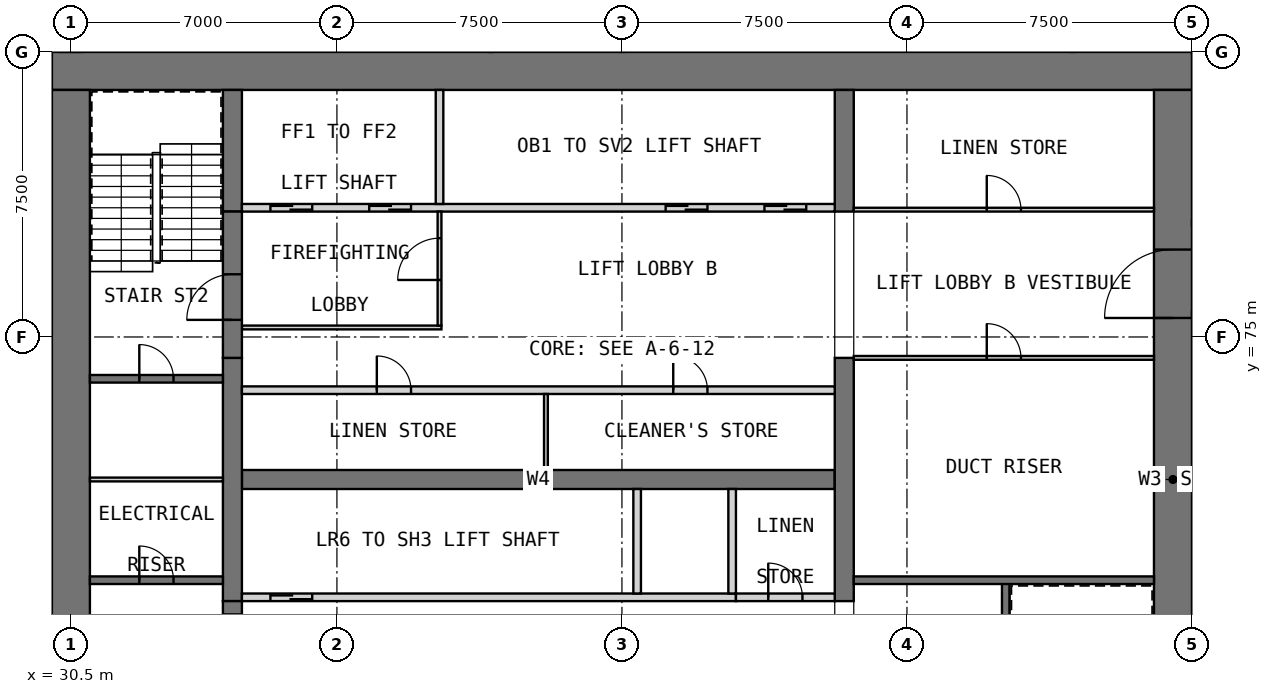
"""IFC4 building model, lengths in metres.
Left out: names, types, materials, properties, quantities, classifications, styles, units other than length and angle.
Written with IfcOpenShell. Run it as: python <this file> out.ifc"""

import sys

from ifc_helpers import new_model, si_unit, direction, frame, frame_2d, origin, place, context, subcontext, project, spatial, rectangle, extrude, element, fill, save


model = new_model("IFC4")
c1 = context("Model", 3, precision=1e-05, world=origin(), true_north=direction((0.0, 1.0)))
c2 = subcontext(c1, "Body", "Model", "MODEL_VIEW")
j1 = project(units=[si_unit("LENGTHUNIT", "METRE"), si_unit("PLANEANGLEUNIT", "RADIAN")], contexts=[c1])
p1 = place(None, origin())
s1 = spatial("IfcSite", under=j1, at=p1, CompositionType="ELEMENT")
p2 = place(p1, origin())
s2 = spatial("IfcBuilding", under=s1, at=p2, CompositionType="ELEMENT")
p3 = place(p2, frame((0.0, 0.0, 44.8)))
s3 = spatial("IfcBuildingStorey", under=s2, at=p3, CompositionType="ELEMENT", Elevation=44.8)
p4 = place(p3, frame((30.0, 82.0, 0.0), z_axis=(0.0, 0.0, 1.0), x_axis=(1.0, 0.0, 0.0)))
e1 = element("IfcWall", 1, at=p4, inside=s3, PredefinedType="SHEAR", context=c2, shape_type="SweptSolid", body=[
    extrude(rectangle(XDim=30.0, YDim=1.0, at=frame_2d((15.0, 0.0))), origin(), (0.0, 0.0, 1.0), 3.6),
])
p5 = place(p3, frame((30.5, 61.0, 0.0), z_axis=(0.0, 0.0, 1.0), x_axis=(0.0, 1.0, 0.0)))
e2 = element("IfcWall", 2, at=p5, inside=s3, PredefinedType="SHEAR", context=c2, shape_type="SweptSolid", body=[
    extrude(rectangle(XDim=20.5, YDim=1.0, at=frame_2d((10.25, 0.0))), origin(), (0.0, 0.0, 1.0), 3.6),
])
p6 = place(p3, frame((59.5, 61.0, 0.0), z_axis=(0.0, 0.0, 1.0), x_axis=(0.0, 1.0, 0.0)))
e3 = element("IfcWall", 3, at=p6, inside=s3, PredefinedType="SHEAR", context=c2, shape_type="SweptSolid", body=[
    extrude(rectangle(XDim=20.5, YDim=1.0, at=frame_2d((10.25, 0.0))), origin(), (0.0, 0.0, 1.0), 3.6),
])
p7 = place(p6, frame((14.5, 0.0, 0.0)))
e4 = element("IfcOpeningElement", 4, at=p7, cuts=e3, PredefinedType="OPENING", context=c2, shape_type="SweptSolid", body=[
    extrude(rectangle(XDim=1.8, YDim=2.1, at=frame_2d((0.9, 1.05))), frame((0.0, 0.51, 0.0), z_axis=(0.0, -1.0, 0.0), x_axis=(1.0, 0.0, 0.0)), (0.0, 0.0, 1.0), 1.02),
])
p8 = place(p3, frame((35.0, 71.25, 0.0), z_axis=(0.0, 0.0, 1.0), x_axis=(1.0, 0.0, 0.0)))
e5 = element("IfcWall", 5, at=p8, inside=s3, PredefinedType="SHEAR", context=c2, shape_type="SweptSolid", body=[
    extrude(rectangle(XDim=15.6, YDim=0.5, at=frame_2d((7.8, 0.0))), origin(), (0.0, 0.0, 1.0), 3.6),
])
p9 = place(p3, frame((34.75, 68.05, 0.0), z_axis=(0.0, 0.0, 1.0), x_axis=(0.0, 1.0, 0.0)))
e6 = element("IfcWall", 6, at=p9, inside=s3, PredefinedType="SHEAR", context=c2, shape_type="SweptSolid", body=[
    extrude(rectangle(XDim=6.4, YDim=0.5, at=frame_2d((3.2, 0.0))), origin(), (0.0, 0.0, 1.0), 3.6),
])
p10 = place(p3, frame((34.75, 78.3, 0.0), z_axis=(0.0, 0.0, 1.0), x_axis=(0.0, 1.0, 0.0)))
e7 = element("IfcWall", 7, at=p10, inside=s3, PredefinedType="SHEAR", context=c2, shape_type="SweptSolid", body=[
    extrude(rectangle(XDim=3.2, YDim=0.5, at=frame_2d((1.6, 0.0))), origin(), (0.0, 0.0, 1.0), 3.6),
])
p11 = place(p3, frame((50.85, 68.05, 0.0), z_axis=(0.0, 0.0, 1.0), x_axis=(0.0, 1.0, 0.0)))
e8 = element("IfcWall", 8, at=p11, inside=s3, PredefinedType="SHEAR", context=c2, shape_type="SweptSolid", body=[
    extrude(rectangle(XDim=6.4, YDim=0.5, at=frame_2d((3.2, 0.0))), origin(), (0.0, 0.0, 1.0), 3.6),
])
p12 = place(p3, frame((50.85, 78.3, 0.0), z_axis=(0.0, 0.0, 1.0), x_axis=(0.0, 1.0, 0.0)))
e9 = element("IfcWall", 9, at=p12, inside=s3, PredefinedType="SHEAR", context=c2, shape_type="SweptSolid", body=[
    extrude(rectangle(XDim=3.2, YDim=0.5, at=frame_2d((1.6, 0.0))), origin(), (0.0, 0.0, 1.0), 3.6),
])
p13 = place(p3, frame((35.0, 68.15, 0.0), z_axis=(0.0, 0.0, 1.0), x_axis=(1.0, 0.0, 0.0)))
e10 = element("IfcWall", 10, at=p13, inside=s3, PredefinedType="SOLIDWALL", context=c2, shape_type="SweptSolid", body=[
    extrude(rectangle(XDim=13.0, YDim=0.2, at=frame_2d((6.5, 0.0))), origin(), (0.0, 0.0, 1.0), 3.6),
])
p14 = place(p13, frame((0.75, 0.0, 0.0)))
e11 = element("IfcOpeningElement", 11, at=p14, cuts=e10, PredefinedType="OPENING", context=c2, shape_type="SweptSolid", body=[
    extrude(rectangle(XDim=1.1, YDim=2.1, at=frame_2d((0.55, 1.05))), frame((0.0, 0.11, 0.0), z_axis=(0.0, -1.0, 0.0), x_axis=(1.0, 0.0, 0.0)), (0.0, 0.0, 1.0), 0.22),
])
for number, where, z_axis, x_axis in (
    (12, (45.4, 68.25, 0.0), (0.0, 0.0, 1.0), (0.0, 1.0, 0.0)),
    (13, (47.9, 68.25, 0.0), (0.0, 0.0, 1.0), (0.0, 1.0, 0.0)),
):
    element("IfcWall", number, at=place(p3, frame(where, z_axis=z_axis, x_axis=x_axis)), inside=s3, PredefinedType="SOLIDWALL", context=c2, shape_type="SweptSolid", body=[
        extrude(rectangle(XDim=2.75, YDim=0.2, at=frame_2d((1.375, 0.0))), origin(), (0.0, 0.0, 1.0), 3.6),
    ])
p15 = place(p3, frame((48.0, 68.15, 0.0), z_axis=(0.0, 0.0, 1.0), x_axis=(1.0, 0.0, 0.0)))
e14 = element("IfcWall", 14, at=p15, inside=s3, PredefinedType="PARTITIONING", context=c2, shape_type="SweptSolid", body=[
    extrude(rectangle(XDim=2.6, YDim=0.2, at=frame_2d((1.3, 0.0))), origin(), (0.0, 0.0, 1.0), 3.35),
])
p16 = place(p15, frame((0.85, 0.0, 0.0)))
e15 = element("IfcOpeningElement", 15, at=p16, cuts=e14, PredefinedType="OPENING", context=c2, shape_type="SweptSolid", body=[
    extrude(rectangle(XDim=0.9, YDim=2.1, at=frame_2d((0.45, 1.05))), frame((0.0, 0.11, 0.0), z_axis=(0.0, -1.0, 0.0), x_axis=(1.0, 0.0, 0.0)), (0.0, 0.0, 1.0), 0.22),
])
p17 = place(p3, frame((35.0, 73.6, 0.0), z_axis=(0.0, 0.0, 1.0), x_axis=(1.0, 0.0, 0.0)))
e16 = element("IfcWall", 16, at=p17, inside=s3, PredefinedType="PARTITIONING", context=c2, shape_type="SweptSolid", body=[
    extrude(rectangle(XDim=15.6, YDim=0.2, at=frame_2d((7.8, 0.0))), origin(), (0.0, 0.0, 1.0), 3.35),
])
p18 = place(p17, frame((3.55, 0.0, 0.0)))
e17 = element("IfcOpeningElement", 17, at=p18, cuts=e16, PredefinedType="OPENING", context=c2, shape_type="SweptSolid", body=[
    extrude(rectangle(XDim=0.9, YDim=2.1, at=frame_2d((0.45, 1.05))), frame((0.0, 0.11, 0.0), z_axis=(0.0, -1.0, 0.0), x_axis=(1.0, 0.0, 0.0)), (0.0, 0.0, 1.0), 0.22),
])
p19 = place(p17, frame((11.35, 0.0, 0.0)))
e18 = element("IfcOpeningElement", 18, at=p19, cuts=e16, PredefinedType="OPENING", context=c2, shape_type="SweptSolid", body=[
    extrude(rectangle(XDim=0.9, YDim=2.1, at=frame_2d((0.45, 1.05))), frame((0.0, 0.11, 0.0), z_axis=(0.0, -1.0, 0.0), x_axis=(1.0, 0.0, 0.0)), (0.0, 0.0, 1.0), 0.22),
])
p20 = place(p3, frame((43.0, 71.5, 0.0), z_axis=(0.0, 0.0, 1.0), x_axis=(0.0, 1.0, 0.0)))
e19 = element("IfcWall", 19, at=p20, inside=s3, PredefinedType="PARTITIONING", context=c2, shape_type="SweptSolid", body=[
    extrude(rectangle(XDim=2.0, YDim=0.1, at=frame_2d((1.0, 0.0))), origin(), (0.0, 0.0, 1.0), 3.35),
])
p21 = place(p3, frame((35.0, 78.4, 0.0), z_axis=(0.0, 0.0, 1.0), x_axis=(1.0, 0.0, 0.0)))
e20 = element("IfcWall", 20, at=p21, inside=s3, PredefinedType="SOLIDWALL", context=c2, shape_type="SweptSolid", body=[
    extrude(rectangle(XDim=15.6, YDim=0.2, at=frame_2d((7.8, 0.0))), origin(), (0.0, 0.0, 1.0), 3.6),
])
p22 = place(p21, frame((0.75, 0.0, 0.0)))
e21 = element("IfcOpeningElement", 21, at=p22, cuts=e20, PredefinedType="OPENING", context=c2, shape_type="SweptSolid", body=[
    extrude(rectangle(XDim=1.1, YDim=2.1, at=frame_2d((0.55, 1.05))), frame((0.0, 0.11, 0.0), z_axis=(0.0, -1.0, 0.0), x_axis=(1.0, 0.0, 0.0)), (0.0, 0.0, 1.0), 0.22),
])
p23 = place(p21, frame((3.35, 0.0, 0.0)))
e22 = element("IfcOpeningElement", 22, at=p23, cuts=e20, PredefinedType="OPENING", context=c2, shape_type="SweptSolid", body=[
    extrude(rectangle(XDim=1.1, YDim=2.1, at=frame_2d((0.55, 1.05))), frame((0.0, 0.11, 0.0), z_axis=(0.0, -1.0, 0.0), x_axis=(1.0, 0.0, 0.0)), (0.0, 0.0, 1.0), 0.22),
])
p24 = place(p21, frame((11.15, 0.0, 0.0)))
e23 = element("IfcOpeningElement", 23, at=p24, cuts=e20, PredefinedType="OPENING", context=c2, shape_type="SweptSolid", body=[
    extrude(rectangle(XDim=1.1, YDim=2.1, at=frame_2d((0.55, 1.05))), frame((0.0, 0.11, 0.0), z_axis=(0.0, -1.0, 0.0), x_axis=(1.0, 0.0, 0.0)), (0.0, 0.0, 1.0), 0.22),
])
p25 = place(p21, frame((13.75, 0.0, 0.0)))
e24 = element("IfcOpeningElement", 24, at=p25, cuts=e20, PredefinedType="OPENING", context=c2, shape_type="SweptSolid", body=[
    extrude(rectangle(XDim=1.1, YDim=2.1, at=frame_2d((0.55, 1.05))), frame((0.0, 0.11, 0.0), z_axis=(0.0, -1.0, 0.0), x_axis=(1.0, 0.0, 0.0)), (0.0, 0.0, 1.0), 0.22),
])
p26 = place(p3, frame((40.2, 78.5, 0.0), z_axis=(0.0, 0.0, 1.0), x_axis=(0.0, 1.0, 0.0)))
e25 = element("IfcWall", 25, at=p26, inside=s3, PredefinedType="SOLIDWALL", context=c2, shape_type="SweptSolid", body=[
    extrude(rectangle(XDim=3.0, YDim=0.2, at=frame_2d((1.5, 0.0))), origin(), (0.0, 0.0, 1.0), 3.6),
])
p27 = place(p3, frame((35.0, 75.25, 0.0), z_axis=(0.0, 0.0, 1.0), x_axis=(1.0, 0.0, 0.0)))
e26 = element("IfcWall", 26, at=p27, inside=s3, PredefinedType="PARTITIONING", context=c2, shape_type="SweptSolid", body=[
    extrude(rectangle(XDim=5.25, YDim=0.1, at=frame_2d((2.625, 0.0))), origin(), (0.0, 0.0, 1.0), 3.35),
])
p28 = place(p3, frame((40.2, 75.3, 0.0), z_axis=(0.0, 0.0, 1.0), x_axis=(0.0, 1.0, 0.0)))
e27 = element("IfcWall", 27, at=p28, inside=s3, PredefinedType="PARTITIONING", context=c2, shape_type="SweptSolid", body=[
    extrude(rectangle(XDim=3.0, YDim=0.1, at=frame_2d((1.5, 0.0))), origin(), (0.0, 0.0, 1.0), 3.35),
])
p29 = place(p28, frame((1.2, 0.0, 0.0)))
e28 = element("IfcOpeningElement", 28, at=p29, cuts=e27, PredefinedType="OPENING", context=c2, shape_type="SweptSolid", body=[
    extrude(rectangle(XDim=1.1, YDim=2.1, at=frame_2d((0.55, 1.05))), frame((0.0, 0.06, 0.0), z_axis=(0.0, -1.0, 0.0), x_axis=(1.0, 0.0, 0.0)), (0.0, 0.0, 1.0), 0.12),
])
p30 = place(p3, frame((34.75, 64.2, 0.0), z_axis=(0.0, 0.0, 1.0), x_axis=(0.0, 1.0, 0.0)))
e29 = element("IfcWall", 29, at=p30, inside=s3, PredefinedType="SOLIDWALL", context=c2, shape_type="SweptSolid", body=[
    extrude(rectangle(XDim=3.85, YDim=0.5, at=frame_2d((1.925, 0.0))), origin(), (0.0, 0.0, 1.0), 2.4),
])
p31 = place(p30, frame((2.3, 0.0, 0.0)))
e30 = element("IfcOpeningElement", 30, at=p31, cuts=e29, PredefinedType="OPENING", context=c2, shape_type="SweptSolid", body=[
    extrude(rectangle(XDim=1.2, YDim=2.1, at=frame_2d((0.6, 1.05))), frame((0.0, 0.26, 0.0), z_axis=(0.0, -1.0, 0.0), x_axis=(1.0, 0.0, 0.0)), (0.0, 0.0, 1.0), 0.52),
])
p32 = place(p3, frame((34.75, 74.45, 0.0), z_axis=(0.0, 0.0, 1.0), x_axis=(0.0, 1.0, 0.0)))
e31 = element("IfcWall", 31, at=p32, inside=s3, PredefinedType="SOLIDWALL", context=c2, shape_type="SweptSolid", body=[
    extrude(rectangle(XDim=3.85, YDim=0.5, at=frame_2d((1.925, 0.0))), origin(), (0.0, 0.0, 1.0), 2.4),
])
p33 = place(p32, frame((1.0, 0.0, 0.0)))
e32 = element("IfcOpeningElement", 32, at=p33, cuts=e31, PredefinedType="OPENING", context=c2, shape_type="SweptSolid", body=[
    extrude(rectangle(XDim=1.2, YDim=2.1, at=frame_2d((0.6, 1.05))), frame((0.0, 0.26, 0.0), z_axis=(0.0, -1.0, 0.0), x_axis=(1.0, 0.0, 0.0)), (0.0, 0.0, 1.0), 0.52),
])
p34 = place(p3, frame((31.0, 68.6, 0.0), z_axis=(0.0, 0.0, 1.0), x_axis=(1.0, 0.0, 0.0)))
e33 = element("IfcWall", 33, at=p34, inside=s3, PredefinedType="SOLIDWALL", context=c2, shape_type="SweptSolid", body=[
    extrude(rectangle(XDim=3.5, YDim=0.2, at=frame_2d((1.75, 0.0))), origin(), (0.0, 0.0, 1.0), 3.35),
])
p35 = place(p34, frame((1.3, 0.0, 0.0)))
e34 = element("IfcOpeningElement", 34, at=p35, cuts=e33, PredefinedType="OPENING", context=c2, shape_type="SweptSolid", body=[
    extrude(rectangle(XDim=0.9, YDim=2.1, at=frame_2d((0.45, 1.05))), frame((0.0, 0.11, 0.0), z_axis=(0.0, -1.0, 0.0), x_axis=(1.0, 0.0, 0.0)), (0.0, 0.0, 1.0), 0.22),
])
p36 = place(p3, frame((31.0, 73.9, 0.0), z_axis=(0.0, 0.0, 1.0), x_axis=(1.0, 0.0, 0.0)))
e35 = element("IfcWall", 35, at=p36, inside=s3, PredefinedType="SOLIDWALL", context=c2, shape_type="SweptSolid", body=[
    extrude(rectangle(XDim=3.5, YDim=0.2, at=frame_2d((1.75, 0.0))), origin(), (0.0, 0.0, 1.0), 3.35),
])
p37 = place(p36, frame((1.3, 0.0, 0.0)))
e36 = element("IfcOpeningElement", 36, at=p37, cuts=e35, PredefinedType="OPENING", context=c2, shape_type="SweptSolid", body=[
    extrude(rectangle(XDim=0.9, YDim=2.1, at=frame_2d((0.45, 1.05))), frame((0.0, 0.11, 0.0), z_axis=(0.0, -1.0, 0.0), x_axis=(1.0, 0.0, 0.0)), (0.0, 0.0, 1.0), 0.22),
])
p38 = place(p3, frame((55.1, 61.0, 0.0), z_axis=(0.0, 0.0, 1.0), x_axis=(0.0, 1.0, 0.0)))
e37 = element("IfcWall", 37, at=p38, inside=s3, PredefinedType="SOLIDWALL", context=c2, shape_type="SweptSolid", body=[
    extrude(rectangle(XDim=7.6, YDim=0.2, at=frame_2d((3.8, 0.0))), origin(), (0.0, 0.0, 1.0), 3.35),
])
p39 = place(p3, frame((51.1, 68.6, 0.0), z_axis=(0.0, 0.0, 1.0), x_axis=(1.0, 0.0, 0.0)))
e38 = element("IfcWall", 38, at=p39, inside=s3, PredefinedType="SOLIDWALL", context=c2, shape_type="SweptSolid", body=[
    extrude(rectangle(XDim=7.9, YDim=0.2, at=frame_2d((3.95, 0.0))), origin(), (0.0, 0.0, 1.0), 3.35),
])
p40 = place(p3, frame((31.0, 71.25, 0.0), z_axis=(0.0, 0.0, 1.0), x_axis=(1.0, 0.0, 0.0)))
e39 = element("IfcWall", 39, at=p40, inside=s3, PredefinedType="PARTITIONING", context=c2, shape_type="SweptSolid", body=[
    extrude(rectangle(XDim=3.5, YDim=0.1, at=frame_2d((1.75, 0.0))), origin(), (0.0, 0.0, 1.0), 3.35),
])
p41 = place(p3, frame((51.1, 74.45, 0.0), z_axis=(0.0, 0.0, 1.0), x_axis=(1.0, 0.0, 0.0)))
e40 = element("IfcWall", 40, at=p41, inside=s3, PredefinedType="PARTITIONING", context=c2, shape_type="SweptSolid", body=[
    extrude(rectangle(XDim=7.9, YDim=0.1, at=frame_2d((3.95, 0.0))), origin(), (0.0, 0.0, 1.0), 3.35),
])
p42 = place(p41, frame((3.5, 0.0, 0.0)))
e41 = element("IfcOpeningElement", 41, at=p42, cuts=e40, PredefinedType="OPENING", context=c2, shape_type="SweptSolid", body=[
    extrude(rectangle(XDim=0.9, YDim=2.1, at=frame_2d((0.45, 1.05))), frame((0.0, 0.06, 0.0), z_axis=(0.0, -1.0, 0.0), x_axis=(1.0, 0.0, 0.0)), (0.0, 0.0, 1.0), 0.12),
])
p43 = place(p3, frame((51.1, 78.35, 0.0), z_axis=(0.0, 0.0, 1.0), x_axis=(1.0, 0.0, 0.0)))
e42 = element("IfcWall", 42, at=p43, inside=s3, PredefinedType="PARTITIONING", context=c2, shape_type="SweptSolid", body=[
    extrude(rectangle(XDim=7.9, YDim=0.1, at=frame_2d((3.95, 0.0))), origin(), (0.0, 0.0, 1.0), 3.35),
])
p44 = place(p43, frame((3.5, 0.0, 0.0)))
e43 = element("IfcOpeningElement", 43, at=p44, cuts=e42, PredefinedType="OPENING", context=c2, shape_type="SweptSolid", body=[
    extrude(rectangle(XDim=0.9, YDim=2.1, at=frame_2d((0.45, 1.05))), frame((0.0, 0.06, 0.0), z_axis=(0.0, -1.0, 0.0), x_axis=(1.0, 0.0, 0.0)), (0.0, 0.0, 1.0), 0.12),
])
p45 = place(p3, frame((60.0, 82.5, 0.0), z_axis=(0.0, 0.0, 1.0), x_axis=(1.0, 0.0, 0.0)))
e44 = element("IfcWall", 44, at=p45, inside=s3, PredefinedType="PARTITIONING", context=c2, shape_type="SweptSolid", body=[
    extrude(rectangle(XDim=14.925, YDim=0.1, at=frame_2d((7.462, 0.0))), origin(), (0.0, 0.0, 1.0), 3.35),
])
for number, where, z_axis, x_axis in (
    (45, (41.55, 82.5, 0.0), (0.0, 0.0, 1.0), (0.0, 1.0, 0.0)),
    (46, (45.0, 82.5, 0.0), (0.0, 0.0, 1.0), (0.0, 1.0, 0.0)),
    (47, (56.85, 82.5, 0.0), (0.0, 0.0, 1.0), (0.0, 1.0, 0.0)),
):
    element("IfcWall", number, at=place(p3, frame(where, z_axis=z_axis, x_axis=x_axis)), inside=s3, PredefinedType="PARTITIONING", context=c2, shape_type="SweptSolid", body=[
        extrude(rectangle(XDim=7.425, YDim=0.1, at=frame_2d((3.712, 0.0))), origin(), (0.0, 0.0, 1.0), 3.35),
    ])
p46 = place(p14, origin())
e48 = element("IfcDoor", 48, at=p46, inside=s3, OperationType="DOUBLE_DOOR_SLIDING", PredefinedType="DOOR", context=c2, shape_type="SweptSolid", body=[
    extrude(rectangle(XDim=1.1, YDim=2.1, at=frame_2d((0.55, 1.05))), frame((0.0, 0.025, 0.0), z_axis=(0.0, -1.0, 0.0), x_axis=(1.0, 0.0, 0.0)), (0.0, 0.0, 1.0), 0.05),
])
fill(e11, e48)
p47 = place(p16, origin())
e49 = element("IfcDoor", 49, at=p47, inside=s3, OperationType="SINGLE_SWING_LEFT", PredefinedType="DOOR", context=c2, shape_type="SweptSolid", body=[
    extrude(rectangle(XDim=0.9, YDim=2.1, at=frame_2d((0.45, 1.05))), frame((0.0, 0.025, 0.0), z_axis=(0.0, -1.0, 0.0), x_axis=(1.0, 0.0, 0.0)), (0.0, 0.0, 1.0), 0.05),
])
fill(e15, e49)
p48 = place(p18, origin())
e50 = element("IfcDoor", 50, at=p48, inside=s3, OperationType="SINGLE_SWING_LEFT", PredefinedType="DOOR", context=c2, shape_type="SweptSolid", body=[
    extrude(rectangle(XDim=0.9, YDim=2.1, at=frame_2d((0.45, 1.05))), frame((0.0, 0.025, 0.0), z_axis=(0.0, -1.0, 0.0), x_axis=(1.0, 0.0, 0.0)), (0.0, 0.0, 1.0), 0.05),
])
fill(e17, e50)
p49 = place(p19, origin())
e51 = element("IfcDoor", 51, at=p49, inside=s3, OperationType="SINGLE_SWING_RIGHT", PredefinedType="DOOR", context=c2, shape_type="SweptSolid", body=[
    extrude(rectangle(XDim=0.9, YDim=2.1, at=frame_2d((0.45, 1.05))), frame((0.0, 0.025, 0.0), z_axis=(0.0, -1.0, 0.0), x_axis=(1.0, 0.0, 0.0)), (0.0, 0.0, 1.0), 0.05),
])
fill(e18, e51)
p50 = place(p22, origin())
e52 = element("IfcDoor", 52, at=p50, inside=s3, OperationType="DOUBLE_DOOR_SLIDING", PredefinedType="DOOR", context=c2, shape_type="SweptSolid", body=[
    extrude(rectangle(XDim=1.1, YDim=2.1, at=frame_2d((0.55, 1.05))), frame((0.0, 0.025, 0.0), z_axis=(0.0, -1.0, 0.0), x_axis=(1.0, 0.0, 0.0)), (0.0, 0.0, 1.0), 0.05),
])
fill(e21, e52)
p51 = place(p23, origin())
e53 = element("IfcDoor", 53, at=p51, inside=s3, OperationType="DOUBLE_DOOR_SLIDING", PredefinedType="DOOR", context=c2, shape_type="SweptSolid", body=[
    extrude(rectangle(XDim=1.1, YDim=2.1, at=frame_2d((0.55, 1.05))), frame((0.0, 0.025, 0.0), z_axis=(0.0, -1.0, 0.0), x_axis=(1.0, 0.0, 0.0)), (0.0, 0.0, 1.0), 0.05),
])
fill(e22, e53)
p52 = place(p24, origin())
e54 = element("IfcDoor", 54, at=p52, inside=s3, OperationType="DOUBLE_DOOR_SLIDING", PredefinedType="DOOR", context=c2, shape_type="SweptSolid", body=[
    extrude(rectangle(XDim=1.1, YDim=2.1, at=frame_2d((0.55, 1.05))), frame((0.0, 0.025, 0.0), z_axis=(0.0, -1.0, 0.0), x_axis=(1.0, 0.0, 0.0)), (0.0, 0.0, 1.0), 0.05),
])
fill(e23, e54)
p53 = place(p25, origin())
e55 = element("IfcDoor", 55, at=p53, inside=s3, OperationType="DOUBLE_DOOR_SLIDING", PredefinedType="DOOR", context=c2, shape_type="SweptSolid", body=[
    extrude(rectangle(XDim=1.1, YDim=2.1, at=frame_2d((0.55, 1.05))), frame((0.0, 0.025, 0.0), z_axis=(0.0, -1.0, 0.0), x_axis=(1.0, 0.0, 0.0)), (0.0, 0.0, 1.0), 0.05),
])
fill(e24, e55)
p54 = place(p7, origin())
e56 = element("IfcDoor", 56, at=p54, inside=s3, OperationType="DOUBLE_DOOR_SINGLE_SWING", PredefinedType="DOOR", context=c2, shape_type="SweptSolid", body=[
    extrude(rectangle(XDim=1.8, YDim=2.1, at=frame_2d((0.9, 1.05))), frame((0.0, 0.025, 0.0), z_axis=(0.0, -1.0, 0.0), x_axis=(1.0, 0.0, 0.0)), (0.0, 0.0, 1.0), 0.05),
])
fill(e4, e56)
p55 = place(p29, origin())
e57 = element("IfcDoor", 57, at=p55, inside=s3, OperationType="SINGLE_SWING_LEFT", PredefinedType="DOOR", context=c2, shape_type="SweptSolid", body=[
    extrude(rectangle(XDim=1.1, YDim=2.1, at=frame_2d((0.55, 1.05))), frame((0.0, 0.025, 0.0), z_axis=(0.0, -1.0, 0.0), x_axis=(1.0, 0.0, 0.0)), (0.0, 0.0, 1.0), 0.05),
])
fill(e28, e57)
p56 = place(p31, origin())
e58 = element("IfcDoor", 58, at=p56, inside=s3, OperationType="SINGLE_SWING_LEFT", PredefinedType="DOOR", context=c2, shape_type="SweptSolid", body=[
    extrude(rectangle(XDim=1.2, YDim=2.1, at=frame_2d((0.6, 1.05))), frame((0.0, 0.025, 0.0), z_axis=(0.0, -1.0, 0.0), x_axis=(1.0, 0.0, 0.0)), (0.0, 0.0, 1.0), 0.05),
])
fill(e30, e58)
p57 = place(p33, origin())
e59 = element("IfcDoor", 59, at=p57, inside=s3, OperationType="SINGLE_SWING_RIGHT", PredefinedType="DOOR", context=c2, shape_type="SweptSolid", body=[
    extrude(rectangle(XDim=1.2, YDim=2.1, at=frame_2d((0.6, 1.05))), frame((0.0, 0.025, 0.0), z_axis=(0.0, -1.0, 0.0), x_axis=(1.0, 0.0, 0.0)), (0.0, 0.0, 1.0), 0.05),
])
fill(e32, e59)
p58 = place(p35, origin())
e60 = element("IfcDoor", 60, at=p58, inside=s3, OperationType="SINGLE_SWING_LEFT", PredefinedType="DOOR", context=c2, shape_type="SweptSolid", body=[
    extrude(rectangle(XDim=0.9, YDim=2.1, at=frame_2d((0.45, 1.05))), frame((0.0, 0.025, 0.0), z_axis=(0.0, -1.0, 0.0), x_axis=(1.0, 0.0, 0.0)), (0.0, 0.0, 1.0), 0.05),
])
fill(e34, e60)
p59 = place(p37, origin())
e61 = element("IfcDoor", 61, at=p59, inside=s3, OperationType="SINGLE_SWING_RIGHT", PredefinedType="DOOR", context=c2, shape_type="SweptSolid", body=[
    extrude(rectangle(XDim=0.9, YDim=2.1, at=frame_2d((0.45, 1.05))), frame((0.0, 0.025, 0.0), z_axis=(0.0, -1.0, 0.0), x_axis=(1.0, 0.0, 0.0)), (0.0, 0.0, 1.0), 0.05),
])
fill(e36, e61)
p60 = place(p42, origin())
e62 = element("IfcDoor", 62, at=p60, inside=s3, OperationType="SINGLE_SWING_LEFT", PredefinedType="DOOR", context=c2, shape_type="SweptSolid", body=[
    extrude(rectangle(XDim=0.9, YDim=2.1, at=frame_2d((0.45, 1.05))), frame((0.0, 0.025, 0.0), z_axis=(0.0, -1.0, 0.0), x_axis=(1.0, 0.0, 0.0)), (0.0, 0.0, 1.0), 0.05),
])
fill(e41, e62)
p61 = place(p44, origin())
e63 = element("IfcDoor", 63, at=p61, inside=s3, OperationType="SINGLE_SWING_LEFT", PredefinedType="DOOR", context=c2, shape_type="SweptSolid", body=[
    extrude(rectangle(XDim=0.9, YDim=2.1, at=frame_2d((0.45, 1.05))), frame((0.0, 0.025, 0.0), z_axis=(0.0, -1.0, 0.0), x_axis=(1.0, 0.0, 0.0)), (0.0, 0.0, 1.0), 0.05),
])
fill(e43, e63)
save(model, sys.argv[1])
